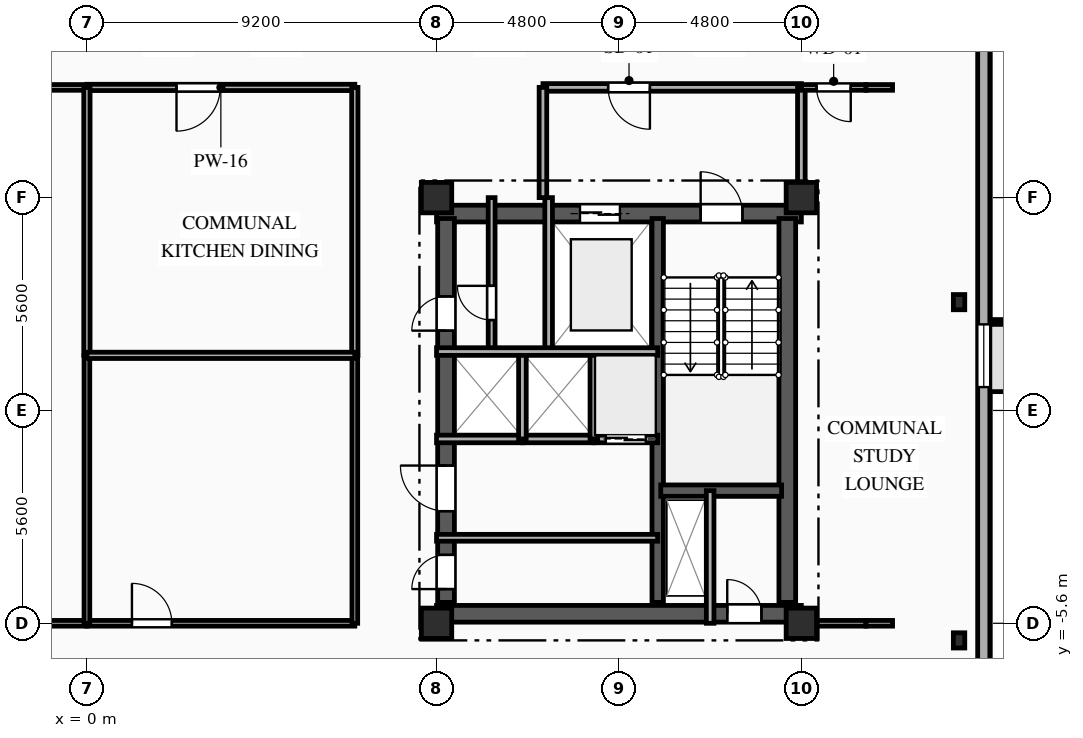
"""IFC4 building model, lengths in metres.
Left out: names, types, materials, properties, quantities, classifications, styles, units other than length and angle.
Written with IfcOpenShell. Run it as: python <this file> out.ifc"""

import sys

from ifc_helpers import new_model, si_unit, direction, frame, frame_2d, origin, origin_2d, place, context, subcontext, project, spatial, rectangle, i_section, extrude, element, fill, save


model = new_model("IFC4")
c1 = context("Model", 3, precision=1e-05, world=origin(), true_north=direction((0.0, 1.0)))
c2 = subcontext(c1, "Body", "Model", "MODEL_VIEW")
j1 = project(units=[si_unit("LENGTHUNIT", "METRE"), si_unit("PLANEANGLEUNIT", "RADIAN")], contexts=[c1])
p1 = place(None, origin())
s1 = spatial("IfcSite", under=j1, at=p1, CompositionType="ELEMENT")
p2 = place(p1, origin())
s2 = spatial("IfcBuilding", under=s1, at=p2, CompositionType="ELEMENT")
p3 = place(p2, frame((0.0, 0.0, 245.05)))
s3 = spatial("IfcBuildingStorey", under=s2, at=p3, CompositionType="ELEMENT", Elevation=245.05)
for number, where, z_axis, x_axis in (
    (1, (9.2, -5.6, 0.0), (0.0, 0.0, 1.0), (1.0, 0.0, 0.0)),
    (2, (9.2, 5.6, 0.0), (0.0, 0.0, 1.0), (1.0, 0.0, 0.0)),
    (3, (18.8, -5.6, 0.0), (0.0, 0.0, 1.0), (1.0, 0.0, 0.0)),
    (4, (18.8, 5.6, 0.0), (0.0, 0.0, 1.0), (1.0, 0.0, 0.0)),
):
    element("IfcColumn", number, at=place(p3, frame(where, z_axis=z_axis, x_axis=x_axis)), inside=s3, PredefinedType="COLUMN", context=c2, shape_type="SweptSolid", body=[
        extrude(rectangle(XDim=0.8, YDim=0.8, at=origin_2d()), origin(), (0.0, 0.0, 1.0), 3.35),
    ])
for number, where, z_axis, x_axis in (
    (5, (22.95, -6.05, 0.0), (0.0, 0.0, 1.0), (1.0, 0.0, 0.0)),
    (6, (22.95, 2.85, 0.0), (0.0, 0.0, 1.0), (1.0, 0.0, 0.0)),
):
    element("IfcColumn", number, at=place(p3, frame(where, z_axis=z_axis, x_axis=x_axis)), inside=s3, PredefinedType="COLUMN", context=c2, shape_type="SweptSolid", body=[
        extrude(i_section(OverallWidth=0.3, OverallDepth=0.4, WebThickness=0.013, FlangeThickness=0.024, FilletRadius=0.027, at=origin_2d()), origin(), (0.0, 0.0, 1.0), 3.35),
    ])
p4 = place(p3, frame((23.6, 12.4, 0.0), z_axis=(0.0, 0.0, 1.0), x_axis=(0.0, -1.0, 0.0)))
e7 = element("IfcWall", 7, at=p4, inside=s3, PredefinedType="SOLIDWALL", context=c2, shape_type="SweptSolid", body=[
    extrude(rectangle(XDim=28.0, YDim=0.32, at=frame_2d((14.0, 0.0))), origin(), (0.0, 0.0, 1.0), 3.04),
])
p5 = place(p4, frame((10.135, 0.0, 0.85)))
e8 = element("IfcOpeningElement", 8, at=p5, cuts=e7, PredefinedType="OPENING", context=c2, shape_type="SweptSolid", body=[
    extrude(rectangle(XDim=1.65, YDim=1.85, at=frame_2d((0.825, 0.925))), frame((0.0, 0.17, 0.0), z_axis=(0.0, -1.0, 0.0), x_axis=(1.0, 0.0, 0.0)), (0.0, 0.0, 1.0), 0.34),
])
p6 = place(p3, frame((9.2, 5.18, 0.0), z_axis=(0.0, 0.0, 1.0), x_axis=(1.0, 0.0, 0.0)))
e9 = element("IfcWall", 9, at=p6, inside=s3, PredefinedType="SHEAR", context=c2, shape_type="SweptSolid", body=[
    extrude(rectangle(XDim=9.6, YDim=0.44, at=frame_2d((4.8, 0.0))), origin(), (0.0, 0.0, 1.0), 3.04),
])
p7 = place(p6, frame((6.95, 0.0, 0.0)))
e10 = element("IfcOpeningElement", 10, at=p7, cuts=e9, PredefinedType="OPENING", context=c2, shape_type="SweptSolid", body=[
    extrude(rectangle(XDim=1.1, YDim=2.15, at=frame_2d((0.55, 1.075))), frame((0.0, 0.23, 0.0), z_axis=(0.0, -1.0, 0.0), x_axis=(1.0, 0.0, 0.0)), (0.0, 0.0, 1.0), 0.46),
])
p8 = place(p6, frame((3.775, 0.0, 0.0)))
e11 = element("IfcOpeningElement", 11, at=p8, cuts=e9, PredefinedType="OPENING", context=c2, shape_type="SweptSolid", body=[
    extrude(rectangle(XDim=1.05, YDim=2.1, at=frame_2d((0.525, 1.05))), frame((0.0, 0.23, 0.0), z_axis=(0.0, -1.0, 0.0), x_axis=(1.0, 0.0, 0.0)), (0.0, 0.0, 1.0), 0.46),
])
p9 = place(p3, frame((9.2, -5.35, 0.0), z_axis=(0.0, 0.0, 1.0), x_axis=(1.0, 0.0, 0.0)))
e12 = element("IfcWall", 12, at=p9, inside=s3, PredefinedType="SHEAR", context=c2, shape_type="SweptSolid", body=[
    extrude(rectangle(XDim=9.6, YDim=0.44, at=frame_2d((4.8, 0.0))), origin(), (0.0, 0.0, 1.0), 3.04),
])
p10 = place(p9, frame((7.65, 0.0, 0.0)))
e13 = element("IfcOpeningElement", 13, at=p10, cuts=e12, PredefinedType="OPENING", context=c2, shape_type="SweptSolid", body=[
    extrude(rectangle(XDim=0.9, YDim=2.1, at=frame_2d((0.45, 1.05))), frame((0.0, 0.23, 0.0), z_axis=(0.0, -1.0, 0.0), x_axis=(1.0, 0.0, 0.0)), (0.0, 0.0, 1.0), 0.46),
])
p11 = place(p3, frame((9.45, -5.05, 0.0), z_axis=(0.0, 0.0, 1.0), x_axis=(0.0, 1.0, 0.0)))
e14 = element("IfcWall", 14, at=p11, inside=s3, PredefinedType="SHEAR", context=c2, shape_type="SweptSolid", body=[
    extrude(rectangle(XDim=10.1, YDim=0.44, at=frame_2d((5.05, 0.0))), origin(), (0.0, 0.0, 1.0), 3.04),
])
p12 = place(p11, frame((7.15, 0.0, 0.0)))
e15 = element("IfcOpeningElement", 15, at=p12, cuts=e14, PredefinedType="OPENING", context=c2, shape_type="SweptSolid", body=[
    extrude(rectangle(XDim=0.9, YDim=2.1, at=frame_2d((0.45, 1.05))), frame((0.0, 0.23, 0.0), z_axis=(0.0, -1.0, 0.0), x_axis=(1.0, 0.0, 0.0)), (0.0, 0.0, 1.0), 0.46),
])
p13 = place(p11, frame((2.4, 0.0, 0.0)))
e16 = element("IfcOpeningElement", 16, at=p13, cuts=e14, PredefinedType="OPENING", context=c2, shape_type="SweptSolid", body=[
    extrude(rectangle(XDim=1.2, YDim=2.15, at=frame_2d((0.6, 1.075))), frame((0.0, 0.23, 0.0), z_axis=(0.0, -1.0, 0.0), x_axis=(1.0, 0.0, 0.0)), (0.0, 0.0, 1.0), 0.46),
])
p14 = place(p11, frame((0.35, 0.0, 0.0)))
e17 = element("IfcOpeningElement", 17, at=p14, cuts=e14, PredefinedType="OPENING", context=c2, shape_type="SweptSolid", body=[
    extrude(rectangle(XDim=0.9, YDim=2.1, at=frame_2d((0.45, 1.05))), frame((0.0, 0.23, 0.0), z_axis=(0.0, -1.0, 0.0), x_axis=(1.0, 0.0, 0.0)), (0.0, 0.0, 1.0), 0.46),
])
p15 = place(p3, frame((18.43, -5.05, 0.0), z_axis=(0.0, 0.0, 1.0), x_axis=(0.0, 1.0, 0.0)))
e18 = element("IfcWall", 18, at=p15, inside=s3, PredefinedType="SHEAR", context=c2, shape_type="SweptSolid", body=[
    extrude(rectangle(XDim=10.1, YDim=0.44, at=frame_2d((5.05, 0.0))), origin(), (0.0, 0.0, 1.0), 3.04),
])
p16 = place(p3, frame((15.02, -5.05, 0.0), z_axis=(0.0, 0.0, 1.0), x_axis=(0.0, 1.0, 0.0)))
e19 = element("IfcWall", 19, at=p16, inside=s3, PredefinedType="SHEAR", context=c2, shape_type="SweptSolid", body=[
    extrude(rectangle(XDim=10.1, YDim=0.3, at=frame_2d((5.05, 0.0))), origin(), (0.0, 0.0, 1.0), 3.04),
])
p17 = place(p3, frame((15.1, -2.11, 0.0), z_axis=(0.0, 0.0, 1.0), x_axis=(1.0, 0.0, 0.0)))
e20 = element("IfcWall", 20, at=p17, inside=s3, PredefinedType="SHEAR", context=c2, shape_type="SweptSolid", body=[
    extrude(rectangle(XDim=3.18, YDim=0.3, at=frame_2d((1.59, 0.0))), origin(), (0.0, 0.0, 1.0), 3.04),
])
p18 = place(p3, frame((16.4, -2.11, 0.0), z_axis=(0.0, 0.0, 1.0), x_axis=(0.0, -1.0, 0.0)))
e21 = element("IfcWall", 21, at=p18, inside=s3, PredefinedType="PARTITIONING", context=c2, shape_type="SweptSolid", body=[
    extrude(rectangle(XDim=3.49, YDim=0.2, at=frame_2d((1.745, 0.0))), origin(), (0.0, 0.0, 1.0), 3.04),
])
p19 = place(p3, frame((12.15, 5.6, 0.0), z_axis=(0.0, 0.0, 1.0), x_axis=(0.0, -1.0, 0.0)))
e22 = element("IfcWall", 22, at=p19, inside=s3, PredefinedType="PARTITIONING", context=c2, shape_type="SweptSolid", body=[
    extrude(rectangle(XDim=4.05, YDim=0.2, at=frame_2d((2.025, 0.0))), origin(), (0.0, 0.0, 1.0), 3.04),
])
p20 = place(p3, frame((18.8, 8.5, 0.0), z_axis=(0.0, 0.0, 1.0), x_axis=(-1.0, 0.0, 0.0)))
e23 = element("IfcWall", 23, at=p20, inside=s3, PredefinedType="PARTITIONING", context=c2, shape_type="SweptSolid", body=[
    extrude(rectangle(XDim=6.8, YDim=0.2, at=frame_2d((3.4, 0.0))), origin(), (0.0, 0.0, 1.0), 3.04),
])
p21 = place(p20, frame((3.985, 0.0, 0.0)))
e24 = element("IfcOpeningElement", 24, at=p21, cuts=e23, PredefinedType="OPENING", context=c2, shape_type="SweptSolid", body=[
    extrude(rectangle(XDim=1.1, YDim=2.15, at=frame_2d((0.55, 1.075))), frame((0.0, 0.11, 0.0), z_axis=(0.0, -1.0, 0.0), x_axis=(1.0, 0.0, 0.0)), (0.0, 0.0, 1.0), 0.22),
])
p22 = place(p3, frame((12.0, 8.5, 0.0), z_axis=(0.0, 0.0, 1.0), x_axis=(0.0, -1.0, 0.0)))
e25 = element("IfcWall", 25, at=p22, inside=s3, PredefinedType="PARTITIONING", context=c2, shape_type="SweptSolid", body=[
    extrude(rectangle(XDim=2.9, YDim=0.2, at=frame_2d((1.45, 0.0))), origin(), (0.0, 0.0, 1.0), 3.04),
])
p23 = place(p3, frame((18.8, 5.6, 0.0), z_axis=(0.0, 0.0, 1.0), x_axis=(0.0, 1.0, 0.0)))
e26 = element("IfcWall", 26, at=p23, inside=s3, PredefinedType="PARTITIONING", context=c2, shape_type="SweptSolid", body=[
    extrude(rectangle(XDim=2.9, YDim=0.2, at=frame_2d((1.45, 0.0))), origin(), (0.0, 0.0, 1.0), 2.665),
])
p24 = place(p3, frame((10.65, 1.55, 0.0), z_axis=(0.0, 0.0, 1.0), x_axis=(0.0, 1.0, 0.0)))
e27 = element("IfcWall", 27, at=p24, inside=s3, PredefinedType="PARTITIONING", context=c2, shape_type="SweptSolid", body=[
    extrude(rectangle(XDim=4.05, YDim=0.18, at=frame_2d((2.025, 0.0))), origin(), (0.0, 0.0, 1.0), 3.04),
])
p25 = place(p24, frame((0.829, 0.0, 0.0)))
e28 = element("IfcOpeningElement", 28, at=p25, cuts=e27, PredefinedType="OPENING", context=c2, shape_type="SweptSolid", body=[
    extrude(rectangle(XDim=0.9, YDim=2.1, at=frame_2d((0.45, 1.05))), frame((0.0, 0.1, 0.0), z_axis=(0.0, -1.0, 0.0), x_axis=(1.0, 0.0, 0.0)), (0.0, 0.0, 1.0), 0.2),
])
p26 = place(p3, frame((9.2, -3.35, 0.0), z_axis=(0.0, 0.0, 1.0), x_axis=(1.0, 0.0, 0.0)))
e29 = element("IfcWall", 29, at=p26, inside=s3, PredefinedType="PARTITIONING", context=c2, shape_type="SweptSolid", body=[
    extrude(rectangle(XDim=5.82, YDim=0.18, at=frame_2d((2.91, 0.0))), origin(), (0.0, 0.0, 1.0), 2.755),
])
p27 = place(p3, frame((11.46, -0.75, 0.0), z_axis=(0.0, 0.0, 1.0), x_axis=(-1.0, 0.0, 0.0)))
e30 = element("IfcWall", 30, at=p27, inside=s3, PredefinedType="PARTITIONING", context=c2, shape_type="SweptSolid", body=[
    extrude(rectangle(XDim=2.26, YDim=0.2, at=frame_2d((1.13, 0.0))), origin(), (0.0, 0.0, 1.0), 3.04),
])
p28 = place(p3, frame((13.34, -0.75, 0.0), z_axis=(0.0, 0.0, 1.0), x_axis=(-1.0, 0.0, 0.0)))
e31 = element("IfcWall", 31, at=p28, inside=s3, PredefinedType="PARTITIONING", context=c2, shape_type="SweptSolid", body=[
    extrude(rectangle(XDim=1.88, YDim=0.2, at=frame_2d((0.94, 0.0))), origin(), (0.0, 0.0, 1.0), 3.04),
])
p29 = place(p3, frame((15.02, -0.75, 0.0), z_axis=(0.0, 0.0, 1.0), x_axis=(-1.0, 0.0, 0.0)))
e32 = element("IfcWall", 32, at=p29, inside=s3, PredefinedType="PARTITIONING", context=c2, shape_type="SweptSolid", body=[
    extrude(rectangle(XDim=1.68, YDim=0.2, at=frame_2d((0.84, 0.0))), origin(), (0.0, 0.0, 1.0), 3.04),
])
p30 = place(p29, frame((0.315, 0.0, 0.0)))
e33 = element("IfcOpeningElement", 33, at=p30, cuts=e32, PredefinedType="OPENING", context=c2, shape_type="SweptSolid", body=[
    extrude(rectangle(XDim=1.05, YDim=2.1, at=frame_2d((0.525, 1.05))), frame((0.0, 0.11, 0.0), z_axis=(0.0, -1.0, 0.0), x_axis=(1.0, 0.0, 0.0)), (0.0, 0.0, 1.0), 0.22),
])
for number, where, z_axis, x_axis in (
    (34, (11.46, -0.75, 0.0), (0.0, 0.0, 1.0), (0.0, 1.0, 0.0)),
    (35, (13.34, -0.75, 0.0), (0.0, 0.0, 1.0), (0.0, 1.0, 0.0)),
):
    element("IfcWall", number, at=place(p3, frame(where, z_axis=z_axis, x_axis=x_axis)), inside=s3, PredefinedType="PARTITIONING", context=c2, shape_type="SweptSolid", body=[
        extrude(rectangle(XDim=2.3, YDim=0.2, at=frame_2d((1.15, 0.0))), origin(), (0.0, 0.0, 1.0), 3.04),
    ])
p31 = place(p3, frame((0.0, 8.5, 0.0), z_axis=(0.0, 0.0, 1.0), x_axis=(-1.0, 0.0, 0.0)))
e36 = element("IfcWall", 36, at=p31, inside=s3, PredefinedType="PARTITIONING", context=c2, shape_type="SweptSolid", body=[
    extrude(rectangle(XDim=7.05, YDim=0.15, at=frame_2d((3.525, 0.0))), origin(), (0.0, 0.0, 1.0), 3.04),
])
p32 = place(p3, frame((20.5, 8.5, 0.0), z_axis=(0.0, 0.0, 1.0), x_axis=(-1.0, 0.0, 0.0)))
e37 = element("IfcWall", 37, at=p32, inside=s3, PredefinedType="PARTITIONING", context=c2, shape_type="SweptSolid", body=[
    extrude(rectangle(XDim=1.7, YDim=0.15, at=frame_2d((0.85, 0.0))), origin(), (0.0, 0.0, 1.0), 3.04),
])
p33 = place(p32, frame((0.4, 0.0, 0.0)))
e38 = element("IfcOpeningElement", 38, at=p33, cuts=e37, PredefinedType="OPENING", context=c2, shape_type="SweptSolid", body=[
    extrude(rectangle(XDim=0.9, YDim=2.1, at=frame_2d((0.45, 1.05))), frame((0.0, 0.085, 0.0), z_axis=(0.0, -1.0, 0.0), x_axis=(1.0, 0.0, 0.0)), (0.0, 0.0, 1.0), 0.17),
])
p34 = place(p3, frame((21.2, 8.5, 0.0), z_axis=(0.0, 0.0, 1.0), x_axis=(-1.0, 0.0, 0.0)))
e39 = element("IfcWall", 39, at=p34, inside=s3, PredefinedType="PARTITIONING", context=c2, shape_type="SweptSolid", body=[
    extrude(rectangle(XDim=0.7, YDim=0.15, at=frame_2d((0.35, 0.0))), origin(), (0.0, 0.0, 1.0), 3.04),
])
p35 = place(p3, frame((7.05, 8.5, 0.0), z_axis=(0.0, 0.0, 1.0), x_axis=(-1.0, 0.0, 0.0)))
e40 = element("IfcWall", 40, at=p35, inside=s3, PredefinedType="PARTITIONING", context=c2, shape_type="SweptSolid", body=[
    extrude(rectangle(XDim=7.05, YDim=0.165, at=frame_2d((3.525, 0.0))), origin(), (0.0, 0.0, 1.0), 3.04),
])
p36 = place(p35, frame((3.542, 0.0, 0.0)))
e41 = element("IfcOpeningElement", 41, at=p36, cuts=e40, PredefinedType="OPENING", context=c2, shape_type="SweptSolid", body=[
    extrude(rectangle(XDim=1.15, YDim=2.15, at=frame_2d((0.575, 1.075))), frame((0.0, 0.093, 0.0), z_axis=(0.0, -1.0, 0.0), x_axis=(1.0, 0.0, 0.0)), (0.0, 0.0, 1.0), 0.185),
])
p37 = place(p3, frame((-7.05, -5.6, 0.0), z_axis=(0.0, 0.0, 1.0), x_axis=(1.0, 0.0, 0.0)))
e42 = element("IfcWall", 42, at=p37, inside=s3, PredefinedType="PARTITIONING", context=c2, shape_type="SweptSolid", body=[
    extrude(rectangle(XDim=7.05, YDim=0.15, at=frame_2d((3.525, 0.0))), origin(), (0.0, 0.0, 1.0), 2.525),
])
p38 = place(p3, frame((18.8, -5.6, 0.0), z_axis=(0.0, 0.0, 1.0), x_axis=(1.0, 0.0, 0.0)))
e43 = element("IfcWall", 43, at=p38, inside=s3, PredefinedType="PARTITIONING", context=c2, shape_type="SweptSolid", body=[
    extrude(rectangle(XDim=1.7, YDim=0.15, at=frame_2d((0.85, 0.0))), origin(), (0.0, 0.0, 1.0), 3.04),
])
p39 = place(p3, frame((20.5, -5.6, 0.0), z_axis=(0.0, 0.0, 1.0), x_axis=(1.0, 0.0, 0.0)))
e44 = element("IfcWall", 44, at=p39, inside=s3, PredefinedType="PARTITIONING", context=c2, shape_type="SweptSolid", body=[
    extrude(rectangle(XDim=0.7, YDim=0.15, at=frame_2d((0.35, 0.0))), origin(), (0.0, 0.0, 1.0), 3.04),
])
p40 = place(p3, frame((0.0, -5.6, 0.0), z_axis=(0.0, 0.0, 1.0), x_axis=(1.0, 0.0, 0.0)))
e45 = element("IfcWall", 45, at=p40, inside=s3, PredefinedType="PARTITIONING", context=c2, shape_type="SweptSolid", body=[
    extrude(rectangle(XDim=7.05, YDim=0.15, at=frame_2d((3.525, 0.0))), origin(), (0.0, 0.0, 1.0), 2.525),
])
p41 = place(p40, frame((1.185, 0.0, 0.0)))
e46 = element("IfcOpeningElement", 46, at=p41, cuts=e45, PredefinedType="OPENING", context=c2, shape_type="SweptSolid", body=[
    extrude(rectangle(XDim=1.05, YDim=2.15, at=frame_2d((0.525, 1.075))), frame((0.0, 0.085, 0.0), z_axis=(0.0, -1.0, 0.0), x_axis=(1.0, 0.0, 0.0)), (0.0, 0.0, 1.0), 0.17),
])
p42 = place(p3, frame((7.05, -5.6, 0.0), z_axis=(0.0, 0.0, 1.0), x_axis=(0.0, 1.0, 0.0)))
e47 = element("IfcWall", 47, at=p42, inside=s3, PredefinedType="PARTITIONING", context=c2, shape_type="SweptSolid", body=[
    extrude(rectangle(XDim=7.05, YDim=0.15, at=frame_2d((3.525, 0.0))), origin(), (0.0, 0.0, 1.0), 3.04),
])
p43 = place(p3, frame((7.05, 1.45, 0.0), z_axis=(0.0, 0.0, 1.0), x_axis=(0.0, 1.0, 0.0)))
e48 = element("IfcWall", 48, at=p43, inside=s3, PredefinedType="PARTITIONING", context=c2, shape_type="SweptSolid", body=[
    extrude(rectangle(XDim=7.05, YDim=0.165, at=frame_2d((3.525, 0.0))), origin(), (0.0, 0.0, 1.0), 3.04),
])
p44 = place(p3, frame((0.0, 1.45, 0.0), z_axis=(0.0, 0.0, 1.0), x_axis=(0.0, -1.0, 0.0)))
e49 = element("IfcWall", 49, at=p44, inside=s3, PredefinedType="PARTITIONING", context=c2, shape_type="SweptSolid", body=[
    extrude(rectangle(XDim=7.05, YDim=0.15, at=frame_2d((3.525, 0.0))), origin(), (0.0, 0.0, 1.0), 3.04),
])
for number, where, z_axis, x_axis in (
    (50, (0.0, 8.5, 0.0), (0.0, 0.0, 1.0), (0.0, -1.0, 0.0)),
    (51, (0.0, 1.45, 0.0), (0.0, 0.0, 1.0), (1.0, 0.0, 0.0)),
):
    element("IfcWall", number, at=place(p3, frame(where, z_axis=z_axis, x_axis=x_axis)), inside=s3, PredefinedType="PARTITIONING", context=c2, shape_type="SweptSolid", body=[
        extrude(rectangle(XDim=7.05, YDim=0.165, at=frame_2d((3.525, 0.0))), origin(), (0.0, 0.0, 1.0), 3.04),
    ])
p45 = place(p3, frame((9.2, 1.55, 0.0), z_axis=(0.0, 0.0, 1.0), x_axis=(1.0, 0.0, 0.0)))
e52 = element("IfcWall", 52, at=p45, inside=s3, PredefinedType="PARTITIONING", context=c2, shape_type="SweptSolid", body=[
    extrude(rectangle(XDim=5.82, YDim=0.2, at=frame_2d((2.91, 0.0))), origin(), (0.0, 0.0, 1.0), 3.04),
])
p46 = place(p5, origin())
e53 = element("IfcWindow", 53, at=p46, inside=s3, PartitioningType="SINGLE_PANEL", PredefinedType="WINDOW", context=c2, shape_type="SweptSolid", body=[
    extrude(rectangle(XDim=1.65, YDim=1.85, at=frame_2d((0.825, 0.925))), frame((0.0, 0.03, 0.0), z_axis=(0.0, -1.0, 0.0), x_axis=(1.0, 0.0, 0.0)), (0.0, 0.0, 1.0), 0.06),
])
fill(e8, e53)
p47 = place(p7, origin())
e54 = element("IfcDoor", 54, at=p47, inside=s3, OperationType="SINGLE_SWING_LEFT", PredefinedType="DOOR", context=c2, shape_type="SweptSolid", body=[
    extrude(rectangle(XDim=1.1, YDim=2.15, at=frame_2d((0.55, 1.075))), frame((0.0, 0.025, 0.0), z_axis=(0.0, -1.0, 0.0), x_axis=(1.0, 0.0, 0.0)), (0.0, 0.0, 1.0), 0.05),
])
fill(e10, e54)
p48 = place(p8, origin())
e55 = element("IfcDoor", 55, at=p48, inside=s3, OperationType="DOUBLE_DOOR_SLIDING", PredefinedType="DOOR", context=c2, shape_type="SweptSolid", body=[
    extrude(rectangle(XDim=1.05, YDim=2.1, at=frame_2d((0.525, 1.05))), frame((0.0, 0.025, 0.0), z_axis=(0.0, -1.0, 0.0), x_axis=(1.0, 0.0, 0.0)), (0.0, 0.0, 1.0), 0.05),
])
fill(e11, e55)
p49 = place(p10, origin())
e56 = element("IfcDoor", 56, at=p49, inside=s3, OperationType="SINGLE_SWING_LEFT", PredefinedType="DOOR", context=c2, shape_type="SweptSolid", body=[
    extrude(rectangle(XDim=0.9, YDim=2.1, at=frame_2d((0.45, 1.05))), frame((0.0, 0.025, 0.0), z_axis=(0.0, -1.0, 0.0), x_axis=(1.0, 0.0, 0.0)), (0.0, 0.0, 1.0), 0.05),
])
fill(e13, e56)
p50 = place(p21, origin())
e57 = element("IfcDoor", 57, at=p50, inside=s3, OperationType="SINGLE_SWING_LEFT", PredefinedType="DOOR", context=c2, shape_type="SweptSolid", body=[
    extrude(rectangle(XDim=1.1, YDim=2.15, at=frame_2d((0.55, 1.075))), frame((0.0, 0.025, 0.0), z_axis=(0.0, -1.0, 0.0), x_axis=(1.0, 0.0, 0.0)), (0.0, 0.0, 1.0), 0.05),
])
fill(e24, e57)
p51 = place(p25, origin())
e58 = element("IfcDoor", 58, at=p51, inside=s3, OperationType="SINGLE_SWING_RIGHT", PredefinedType="DOOR", context=c2, shape_type="SweptSolid", body=[
    extrude(rectangle(XDim=0.9, YDim=2.1, at=frame_2d((0.45, 1.05))), frame((0.0, 0.025, 0.0), z_axis=(0.0, -1.0, 0.0), x_axis=(1.0, 0.0, 0.0)), (0.0, 0.0, 1.0), 0.05),
])
fill(e28, e58)
p52 = place(p12, origin())
e59 = element("IfcDoor", 59, at=p52, inside=s3, OperationType="SINGLE_SWING_LEFT", PredefinedType="DOOR", context=c2, shape_type="SweptSolid", body=[
    extrude(rectangle(XDim=0.9, YDim=2.1, at=frame_2d((0.45, 1.05))), frame((0.0, 0.025, 0.0), z_axis=(0.0, -1.0, 0.0), x_axis=(1.0, 0.0, 0.0)), (0.0, 0.0, 1.0), 0.05),
])
fill(e15, e59)
p53 = place(p30, origin())
e60 = element("IfcDoor", 60, at=p53, inside=s3, OperationType="DOUBLE_DOOR_SLIDING", PredefinedType="DOOR", context=c2, shape_type="SweptSolid", body=[
    extrude(rectangle(XDim=1.05, YDim=2.1, at=frame_2d((0.525, 1.05))), frame((0.0, 0.025, 0.0), z_axis=(0.0, -1.0, 0.0), x_axis=(1.0, 0.0, 0.0)), (0.0, 0.0, 1.0), 0.05),
])
fill(e33, e60)
p54 = place(p13, origin())
e61 = element("IfcDoor", 61, at=p54, inside=s3, OperationType="SINGLE_SWING_RIGHT", PredefinedType="DOOR", context=c2, shape_type="SweptSolid", body=[
    extrude(rectangle(XDim=1.2, YDim=2.15, at=frame_2d((0.6, 1.075))), frame((0.0, 0.025, 0.0), z_axis=(0.0, -1.0, 0.0), x_axis=(1.0, 0.0, 0.0)), (0.0, 0.0, 1.0), 0.05),
])
fill(e16, e61)
p55 = place(p14, origin())
e62 = element("IfcDoor", 62, at=p55, inside=s3, OperationType="SINGLE_SWING_LEFT", PredefinedType="DOOR", context=c2, shape_type="SweptSolid", body=[
    extrude(rectangle(XDim=0.9, YDim=2.1, at=frame_2d((0.45, 1.05))), frame((0.0, 0.025, 0.0), z_axis=(0.0, -1.0, 0.0), x_axis=(1.0, 0.0, 0.0)), (0.0, 0.0, 1.0), 0.05),
])
fill(e17, e62)
p56 = place(p33, origin())
e63 = element("IfcDoor", 63, at=p56, inside=s3, OperationType="SINGLE_SWING_LEFT", PredefinedType="DOOR", context=c2, shape_type="SweptSolid", body=[
    extrude(rectangle(XDim=0.9, YDim=2.1, at=frame_2d((0.45, 1.05))), frame((0.0, 0.025, 0.0), z_axis=(0.0, -1.0, 0.0), x_axis=(1.0, 0.0, 0.0)), (0.0, 0.0, 1.0), 0.05),
])
fill(e38, e63)
p57 = place(p36, origin())
e64 = element("IfcDoor", 64, at=p57, inside=s3, OperationType="SINGLE_SWING_RIGHT", PredefinedType="DOOR", context=c2, shape_type="SweptSolid", body=[
    extrude(rectangle(XDim=1.15, YDim=2.15, at=frame_2d((0.575, 1.075))), frame((0.0, 0.025, 0.0), z_axis=(0.0, -1.0, 0.0), x_axis=(1.0, 0.0, 0.0)), (0.0, 0.0, 1.0), 0.05),
])
fill(e41, e64)
p58 = place(p41, origin())
e65 = element("IfcDoor", 65, at=p58, inside=s3, OperationType="SINGLE_SWING_LEFT", PredefinedType="DOOR", context=c2, shape_type="SweptSolid", body=[
    extrude(rectangle(XDim=1.05, YDim=2.15, at=frame_2d((0.525, 1.075))), frame((0.0, 0.025, 0.0), z_axis=(0.0, -1.0, 0.0), x_axis=(1.0, 0.0, 0.0)), (0.0, 0.0, 1.0), 0.05),
])
fill(e46, e65)
save(model, sys.argv[1])
